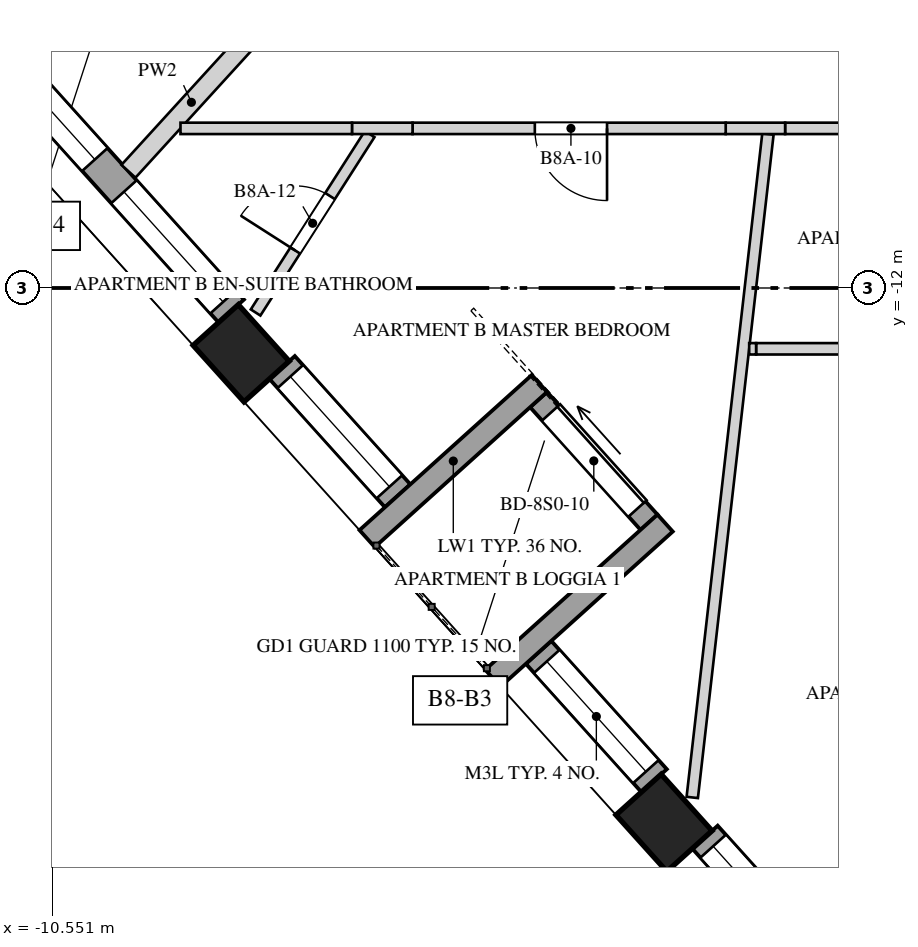
"""IFC4 building model, lengths in metres.
Left out: names, types, materials, properties, quantities, classifications, styles, units other than length and angle.
Written with IfcOpenShell. Run it as: python <this file> out.ifc"""

import sys

from ifc_helpers import new_model, si_unit, direction, frame, frame_2d, origin, origin_2d, place, context, subcontext, project, spatial, rectangle, extrude, element, fill, save


model = new_model("IFC4")
c1 = context("Model", 3, precision=1e-05, world=origin(), true_north=direction((0.0, 1.0)))
c2 = subcontext(c1, "Body", "Model", "MODEL_VIEW")
j1 = project(units=[si_unit("LENGTHUNIT", "METRE"), si_unit("PLANEANGLEUNIT", "RADIAN")], contexts=[c1])
p1 = place(None, origin())
s1 = spatial("IfcSite", under=j1, at=p1, CompositionType="ELEMENT")
p2 = place(p1, origin())
s2 = spatial("IfcBuilding", under=s1, at=p2, CompositionType="ELEMENT")
p3 = place(p2, frame((0.0, 0.0, 320.4)))
s3 = spatial("IfcBuildingStorey", under=s2, at=p3, CompositionType="ELEMENT", Elevation=320.4)
for number, where, z_axis, x_axis in (
    (1, (-8.068, -12.858, -0.35), (0.0, 0.0, 1.0), (0.669, -0.743, 0.0)),
    (2, (-2.505, -19.037, -0.35), (0.0, 0.0, 1.0), (0.669, -0.743, 0.0)),
):
    element("IfcColumn", number, at=place(p3, frame(where, z_axis=z_axis, x_axis=x_axis)), inside=s3, PredefinedType="COLUMN", context=c2, shape_type="SweptSolid", body=[
        extrude(rectangle(XDim=1.0, YDim=0.8, at=origin_2d()), origin(), (0.0, 0.0, 1.0), 4.35),
    ])
p4 = place(p3, frame((-13.093, -6.868, 0.0), z_axis=(0.0, 0.0, 1.0), x_axis=(0.669136224502, -0.74313976684, 0.0)))
e3 = element("IfcWall", 3, at=p4, inside=s3, PredefinedType="SOLIDWALL", context=c2, shape_type="SweptSolid", body=[
    extrude(rectangle(XDim=7.314, YDim=0.45, at=frame_2d((3.657, 0.0))), origin(), (0.0, 0.0, 1.0), 3.3),
])
p5 = place(p4, frame((0.161, 0.0, 0.4)))
e4 = element("IfcOpeningElement", 4, at=p5, cuts=e3, PredefinedType="OPENING", context=c2, shape_type="SweptSolid", body=[
    extrude(rectangle(XDim=1.95, YDim=2.75, at=frame_2d((0.975, 1.375))), frame((0.0, 0.235, 0.0), z_axis=(0.0, -1.0, 0.0), x_axis=(1.0, 0.0, 0.0)), (0.0, 0.0, 1.0), 0.47),
])
p6 = place(p4, frame((2.682, 0.0, 0.4)))
e5 = element("IfcOpeningElement", 5, at=p6, cuts=e3, PredefinedType="OPENING", context=c2, shape_type="SweptSolid", body=[
    extrude(rectangle(XDim=1.95, YDim=2.75, at=frame_2d((0.975, 1.375))), frame((0.0, 0.235, 0.0), z_axis=(0.0, -1.0, 0.0), x_axis=(1.0, 0.0, 0.0)), (0.0, 0.0, 1.0), 0.47),
])
p7 = place(p4, frame((5.203, 0.0, 0.4)))
e6 = element("IfcOpeningElement", 6, at=p7, cuts=e3, PredefinedType="OPENING", context=c2, shape_type="SweptSolid", body=[
    extrude(rectangle(XDim=1.95, YDim=2.75, at=frame_2d((0.975, 1.375))), frame((0.0, 0.235, 0.0), z_axis=(0.0, -1.0, 0.0), x_axis=(1.0, 0.0, 0.0)), (0.0, 0.0, 1.0), 0.47),
])
p8 = place(p3, frame((-7.53, -13.046, 0.0), z_axis=(0.0, 0.0, 1.0), x_axis=(0.669160694992, -0.743117732447, 0.0)))
e7 = element("IfcWall", 7, at=p8, inside=s3, PredefinedType="SOLIDWALL", context=c2, shape_type="SweptSolid", body=[
    extrude(rectangle(XDim=2.271, YDim=0.45, at=frame_2d((1.136, 0.0))), origin(), (0.0, 0.0, 1.0), 3.3),
])
p9 = place(p8, frame((0.161, 0.0, 0.4)))
e8 = element("IfcOpeningElement", 8, at=p9, cuts=e7, PredefinedType="OPENING", context=c2, shape_type="SweptSolid", body=[
    extrude(rectangle(XDim=1.95, YDim=2.75, at=frame_2d((0.975, 1.375))), frame((0.0, 0.235, 0.0), z_axis=(0.0, -1.0, 0.0), x_axis=(1.0, 0.0, 0.0)), (0.0, 0.0, 1.0), 0.47),
])
p10 = place(p3, frame((-4.155, -16.793, 0.0), z_axis=(0.0, 0.0, 1.0), x_axis=(0.669160694992, -0.743117732447, 0.0)))
e9 = element("IfcWall", 9, at=p10, inside=s3, PredefinedType="SOLIDWALL", context=c2, shape_type="SweptSolid", body=[
    extrude(rectangle(XDim=2.271, YDim=0.45, at=frame_2d((1.136, 0.0))), origin(), (0.0, 0.0, 1.0), 3.3),
])
p11 = place(p10, frame((0.161, 0.0, 0.4)))
e10 = element("IfcOpeningElement", 10, at=p11, cuts=e9, PredefinedType="OPENING", context=c2, shape_type="SweptSolid", body=[
    extrude(rectangle(XDim=1.95, YDim=2.1, at=frame_2d((0.975, 1.05))), frame((0.0, 0.235, 0.0), z_axis=(0.0, -1.0, 0.0), x_axis=(1.0, 0.0, 0.0)), (0.0, 0.0, 1.0), 0.47),
])
p12 = place(p3, frame((-1.966, -19.224, 0.0), z_axis=(0.0, 0.0, 1.0), x_axis=(0.669107243666, -0.743165860676, 0.0)))
e11 = element("IfcWall", 11, at=p12, inside=s3, PredefinedType="SOLIDWALL", context=c2, shape_type="SweptSolid", body=[
    extrude(rectangle(XDim=2.271, YDim=0.45, at=frame_2d((1.136, 0.0))), origin(), (0.0, 0.0, 1.0), 3.3),
])
p13 = place(p12, frame((0.161, 0.0, 0.4)))
e12 = element("IfcOpeningElement", 12, at=p13, cuts=e11, PredefinedType="OPENING", context=c2, shape_type="SweptSolid", body=[
    extrude(rectangle(XDim=1.95, YDim=2.75, at=frame_2d((0.975, 1.375))), frame((0.0, 0.235, 0.0), z_axis=(0.0, -1.0, 0.0), x_axis=(1.0, 0.0, 0.0)), (0.0, 0.0, 1.0), 0.47),
])
p14 = place(p3, frame((-4.156, -13.468, 0.0), z_axis=(0.0, 0.0, 1.0), x_axis=(0.669144868344, -0.743131983681, 0.0)))
e13 = element("IfcWall", 13, at=p14, inside=s3, PredefinedType="SOLIDWALL", context=c2, shape_type="SweptSolid", body=[
    extrude(rectangle(XDim=2.171, YDim=0.3, at=frame_2d((1.085, 0.0))), origin(), (0.0, 0.0, 1.0), 3.3),
])
p15 = place(p14, frame((0.236, 0.0, 0.0)))
e14 = element("IfcOpeningElement", 14, at=p15, cuts=e13, PredefinedType="OPENING", context=c2, shape_type="SweptSolid", body=[
    extrude(rectangle(XDim=1.7, YDim=2.5, at=frame_2d((0.85, 1.25))), frame((0.0, 0.16, 0.0), z_axis=(0.0, -1.0, 0.0), x_axis=(1.0, 0.0, 0.0)), (0.0, 0.0, 1.0), 0.32),
])
for number, where, z_axis, x_axis in (
    (15, (-6.411, -15.297, 0.0), (0.0, 0.0, 1.0), (0.743, 0.669, 0.0)),
    (16, (-4.757, -17.134, 0.0), (0.0, 0.0, 1.0), (0.743, 0.669, 0.0)),
    (17, (-0.848, -21.476, 0.0), (0.0, 0.0, 1.0), (0.743, 0.669, 0.0)),
):
    element("IfcWall", number, at=place(p3, frame(where, z_axis=z_axis, x_axis=x_axis)), inside=s3, PredefinedType="SOLIDWALL", context=c2, shape_type="SweptSolid", body=[
        extrude(rectangle(XDim=3.05, YDim=0.3, at=frame_2d((1.525, 0.0))), origin(), (0.0, 0.0, 1.0), 3.3),
    ])
p16 = place(p3, frame((-7.895, -8.65, 0.0), z_axis=(0.0, 0.0, 1.0), x_axis=(-0.674170376645, -0.738575861543, 0.0)))
e18 = element("IfcWall", 18, at=p16, inside=s3, PredefinedType="SOLIDWALL", context=c2, shape_type="SweptSolid", body=[
    extrude(rectangle(XDim=2.456, YDim=0.25, at=frame_2d((1.228, 0.0))), origin(), (0.0, 0.0, 1.0), 3.65),
])
p17 = place(p3, frame((-7.878, -12.322, 0.0), z_axis=(0.0, 0.0, 1.0), x_axis=(0.5386831167, 0.842508456801, 0.0)))
e19 = element("IfcWall", 19, at=p17, inside=s3, PredefinedType="PARTITIONING", context=c2, shape_type="SweptSolid", body=[
    extrude(rectangle(XDim=2.786, YDim=0.15, at=frame_2d((1.393, 0.0))), origin(), (0.0, 0.0, 1.0), 2.95),
])
p18 = place(p17, frame((0.968, 0.0, 0.0)))
e20 = element("IfcOpeningElement", 20, at=p18, cuts=e19, PredefinedType="OPENING", context=c2, shape_type="SweptSolid", body=[
    extrude(rectangle(XDim=0.85, YDim=2.4, at=frame_2d((0.425, 1.2))), frame((0.0, 0.085, 0.0), z_axis=(0.0, -1.0, 0.0), x_axis=(1.0, 0.0, 0.0)), (0.0, 0.0, 1.0), 0.17),
])
p19 = place(p3, frame((-2.134, -18.702, 0.0), z_axis=(0.0, 0.0, 1.0), x_axis=(0.113371784985, 0.993552634926, 0.0)))
e21 = element("IfcWall", 21, at=p19, inside=s3, PredefinedType="PARTITIONING", context=c2, shape_type="SweptSolid", body=[
    extrude(rectangle(XDim=8.784, YDim=0.15, at=frame_2d((4.392, 0.0))), origin(), (0.0, 0.0, 1.0), 2.75),
])
p20 = place(p3, frame((0.0, -9.9, 0.0), z_axis=(0.0, 0.0, 1.0), x_axis=(-1.0, 0.0, 0.0)))
e22 = element("IfcWall", 22, at=p20, inside=s3, PredefinedType="PARTITIONING", context=c2, shape_type="SweptSolid", body=[
    extrude(rectangle(XDim=0.913, YDim=0.15, at=frame_2d((0.456, 0.0))), origin(), (0.0, 0.0, 1.0), 3.65),
])
p21 = place(p3, frame((-0.912, -9.9, 0.0), z_axis=(0.0, 0.0, 1.0), x_axis=(-1.0, 0.0, 0.0)))
e23 = element("IfcWall", 23, at=p21, inside=s3, PredefinedType="PARTITIONING", context=c2, shape_type="SweptSolid", body=[
    extrude(rectangle(XDim=0.782, YDim=0.15, at=frame_2d((0.391, 0.0))), origin(), (0.0, 0.0, 1.0), 2.75),
])
p22 = place(p3, frame((-1.694, -9.9, 0.0), z_axis=(0.0, 0.0, 1.0), x_axis=(-1.0, 0.0, 0.0)))
e24 = element("IfcWall", 24, at=p22, inside=s3, PredefinedType="PARTITIONING", context=c2, shape_type="SweptSolid", body=[
    extrude(rectangle(XDim=4.12, YDim=0.15, at=frame_2d((2.06, 0.0))), origin(), (0.0, 0.0, 1.0), 3.65),
])
p23 = place(p22, frame((1.561, 0.0, 0.0)))
e25 = element("IfcOpeningElement", 25, at=p23, cuts=e24, PredefinedType="OPENING", context=c2, shape_type="SweptSolid", body=[
    extrude(rectangle(XDim=0.95, YDim=2.4, at=frame_2d((0.475, 1.2))), frame((0.0, 0.085, 0.0), z_axis=(0.0, -1.0, 0.0), x_axis=(1.0, 0.0, 0.0)), (0.0, 0.0, 1.0), 0.17),
])
p24 = place(p3, frame((-5.813, -9.9, 0.0), z_axis=(0.0, 0.0, 1.0), x_axis=(-1.0, 0.0, 0.0)))
e26 = element("IfcWall", 26, at=p24, inside=s3, PredefinedType="PARTITIONING", context=c2, shape_type="SweptSolid", body=[
    extrude(rectangle(XDim=0.797, YDim=0.15, at=frame_2d((0.398, 0.0))), origin(), (0.0, 0.0, 1.0), 2.95),
])
p25 = place(p3, frame((-6.61, -9.9, 0.0), z_axis=(0.0, 0.0, 1.0), x_axis=(-1.0, 0.0, 0.0)))
e27 = element("IfcWall", 27, at=p25, inside=s3, PredefinedType="PARTITIONING", context=c2, shape_type="SweptSolid", body=[
    extrude(rectangle(XDim=2.256, YDim=0.15, at=frame_2d((1.128, 0.0))), origin(), (0.0, 0.0, 1.0), 3.65),
])
p26 = place(p3, frame((1.011, -12.8, 0.0), z_axis=(0.0, 0.0, 1.0), x_axis=(-1.0, 0.0, 0.0)))
e28 = element("IfcWall", 28, at=p26, inside=s3, PredefinedType="PARTITIONING", context=c2, shape_type="SweptSolid", body=[
    extrude(rectangle(XDim=2.305, YDim=0.15, at=frame_2d((1.152, 0.0))), origin(), (0.0, 0.0, 1.0), 3.65),
])
p27 = place(p3, frame((-1.294, -12.8, 0.0), z_axis=(0.0, 0.0, 1.0), x_axis=(-1.0, 0.0, 0.0)))
e29 = element("IfcWall", 29, at=p27, inside=s3, PredefinedType="PARTITIONING", context=c2, shape_type="SweptSolid", body=[
    extrude(rectangle(XDim=0.091, YDim=0.15, at=frame_2d((0.045, 0.0))), origin(), (0.0, 0.0, 1.0), 2.75),
])
p28 = place(p6, origin())
e30 = element("IfcWindow", 30, at=p28, inside=s3, PartitioningType="SINGLE_PANEL", PredefinedType="WINDOW", context=c2, shape_type="SweptSolid", body=[
    extrude(rectangle(XDim=1.95, YDim=2.75, at=frame_2d((0.975, 1.375))), frame((0.0, 0.03, 0.0), z_axis=(0.0, -1.0, 0.0), x_axis=(1.0, 0.0, 0.0)), (0.0, 0.0, 1.0), 0.06),
])
fill(e5, e30)
p29 = place(p7, origin())
e31 = element("IfcWindow", 31, at=p29, inside=s3, PartitioningType="SINGLE_PANEL", PredefinedType="WINDOW", context=c2, shape_type="SweptSolid", body=[
    extrude(rectangle(XDim=1.95, YDim=2.75, at=frame_2d((0.975, 1.375))), frame((0.0, 0.03, 0.0), z_axis=(0.0, -1.0, 0.0), x_axis=(1.0, 0.0, 0.0)), (0.0, 0.0, 1.0), 0.06),
])
fill(e6, e31)
p30 = place(p9, origin())
e32 = element("IfcWindow", 32, at=p30, inside=s3, PartitioningType="SINGLE_PANEL", PredefinedType="WINDOW", context=c2, shape_type="SweptSolid", body=[
    extrude(rectangle(XDim=1.95, YDim=2.75, at=frame_2d((0.975, 1.375))), frame((0.0, 0.03, 0.0), z_axis=(0.0, -1.0, 0.0), x_axis=(1.0, 0.0, 0.0)), (0.0, 0.0, 1.0), 0.06),
])
fill(e8, e32)
p31 = place(p11, origin())
e33 = element("IfcWindow", 33, at=p31, inside=s3, PartitioningType="SINGLE_PANEL", PredefinedType="WINDOW", context=c2, shape_type="SweptSolid", body=[
    extrude(rectangle(XDim=1.95, YDim=2.1, at=frame_2d((0.975, 1.05))), frame((0.0, 0.03, 0.0), z_axis=(0.0, -1.0, 0.0), x_axis=(1.0, 0.0, 0.0)), (0.0, 0.0, 1.0), 0.06),
])
fill(e10, e33)
p32 = place(p13, origin())
e34 = element("IfcWindow", 34, at=p32, inside=s3, PartitioningType="SINGLE_PANEL", PredefinedType="WINDOW", context=c2, shape_type="SweptSolid", body=[
    extrude(rectangle(XDim=1.95, YDim=2.75, at=frame_2d((0.975, 1.375))), frame((0.0, 0.03, 0.0), z_axis=(0.0, -1.0, 0.0), x_axis=(1.0, 0.0, 0.0)), (0.0, 0.0, 1.0), 0.06),
])
fill(e12, e34)
p33 = place(p15, origin())
e35 = element("IfcDoor", 35, at=p33, inside=s3, OperationType="SLIDING_TO_LEFT", PredefinedType="DOOR", context=c2, shape_type="SweptSolid", body=[
    extrude(rectangle(XDim=1.7, YDim=2.5, at=frame_2d((0.85, 1.25))), frame((0.0, 0.025, 0.0), z_axis=(0.0, -1.0, 0.0), x_axis=(1.0, 0.0, 0.0)), (0.0, 0.0, 1.0), 0.05),
])
fill(e14, e35)
p34 = place(p23, origin())
e36 = element("IfcDoor", 36, at=p34, inside=s3, OperationType="SINGLE_SWING_RIGHT", PredefinedType="DOOR", context=c2, shape_type="SweptSolid", body=[
    extrude(rectangle(XDim=0.95, YDim=2.4, at=frame_2d((0.475, 1.2))), frame((0.0, 0.025, 0.0), z_axis=(0.0, -1.0, 0.0), x_axis=(1.0, 0.0, 0.0)), (0.0, 0.0, 1.0), 0.05),
])
fill(e25, e36)
p35 = place(p18, origin())
e37 = element("IfcDoor", 37, at=p35, inside=s3, OperationType="SINGLE_SWING_RIGHT", PredefinedType="DOOR", context=c2, shape_type="SweptSolid", body=[
    extrude(rectangle(XDim=0.85, YDim=2.4, at=frame_2d((0.425, 1.2))), frame((0.0, 0.025, 0.0), z_axis=(0.0, -1.0, 0.0), x_axis=(1.0, 0.0, 0.0)), (0.0, 0.0, 1.0), 0.05),
])
fill(e20, e37)
save(model, sys.argv[1])
